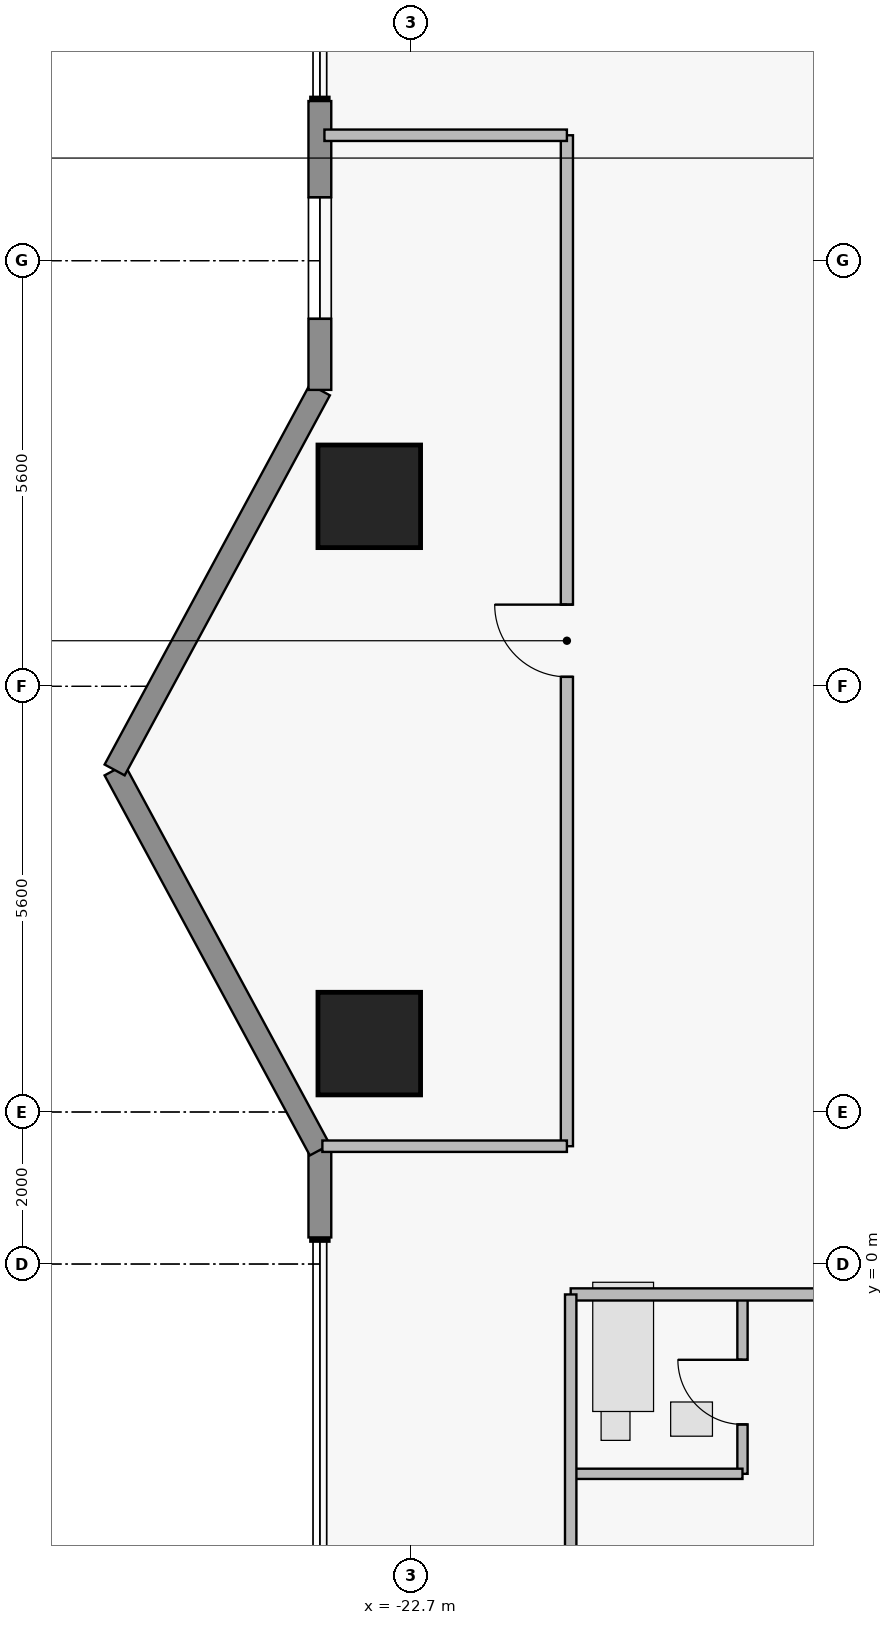
"""IFC4 building model, lengths in metres.
Left out: names, types, materials, properties, quantities, classifications, styles, units other than length and angle.
Written with IfcOpenShell. Run it as: python <this file> out.ifc"""

import sys

from ifc_helpers import new_model, si_unit, direction, frame, frame_2d, origin, origin_2d, place, context, subcontext, project, spatial, rectangle, extrude, element, fill, save


model = new_model("IFC4")
c1 = context("Model", 3, precision=1e-05, world=origin(), true_north=direction((0.0, 1.0)))
c2 = subcontext(c1, "Body", "Model", "MODEL_VIEW")
j1 = project(units=[si_unit("LENGTHUNIT", "METRE"), si_unit("PLANEANGLEUNIT", "RADIAN")], contexts=[c1])
p1 = place(None, origin())
s1 = spatial("IfcSite", under=j1, at=p1, CompositionType="ELEMENT")
p2 = place(p1, origin())
s2 = spatial("IfcBuilding", under=s1, at=p2, CompositionType="ELEMENT")
p3 = place(p2, frame((0.0, 0.0, 139.45)))
s3 = spatial("IfcBuildingStorey", under=s2, at=p3, CompositionType="ELEMENT", Elevation=139.45)
for number, where, z_axis, x_axis in (
    (1, (-23.25, 2.9, 0.0), (0.0, 0.0, 1.0), (1.0, 0.0, 0.0)),
    (2, (-23.25, 10.1, 0.0), (0.0, 0.0, 1.0), (1.0, 0.0, 0.0)),
):
    element("IfcColumn", number, at=place(p3, frame(where, z_axis=z_axis, x_axis=x_axis)), inside=s3, PredefinedType="COLUMN", context=c2, shape_type="SweptSolid", body=[
        extrude(rectangle(XDim=1.35, YDim=1.35, at=origin_2d()), origin(), (0.0, 0.0, 1.0), 3.65),
    ])
p4 = place(p3, frame((-23.9, 0.35, 0.0), z_axis=(0.0, 0.0, 1.0), x_axis=(0.0, 1.0, 0.0)))
e3 = element("IfcWall", 3, at=p4, inside=s3, PredefinedType="STANDARD", context=c2, shape_type="SweptSolid", body=[
    extrude(rectangle(XDim=1.15, YDim=0.3, at=frame_2d((0.575, 0.0))), origin(), (0.0, 0.0, 1.0), 3.43),
])
for number, where, z_axis, x_axis in (
    (4, (-23.9, 1.5, 0.0), (0.0, 0.0, 1.0), (-0.475, 0.88, 0.0)),
    (5, (-26.6, 6.5, 0.0), (0.0, 0.0, 1.0), (0.475, 0.88, 0.0)),
):
    element("IfcWall", number, at=place(p3, frame(where, z_axis=z_axis, x_axis=x_axis)), inside=s3, PredefinedType="STANDARD", context=c2, shape_type="SweptSolid", body=[
        extrude(rectangle(XDim=5.683, YDim=0.3, at=frame_2d((2.841, 0.0))), origin(), (0.0, 0.0, 1.0), 3.43),
    ])
p5 = place(p3, frame((-23.9, 11.5, 0.0), z_axis=(0.0, 0.0, 1.0), x_axis=(0.0, 1.0, 0.0)))
e6 = element("IfcWall", 6, at=p5, inside=s3, PredefinedType="STANDARD", context=c2, shape_type="SweptSolid", body=[
    extrude(rectangle(XDim=3.8, YDim=0.3, at=frame_2d((1.9, 0.0))), origin(), (0.0, 0.0, 1.0), 3.43),
])
p6 = place(p5, frame((0.935, 0.0, 0.85)))
e7 = element("IfcOpeningElement", 7, at=p6, cuts=e6, PredefinedType="OPENING", context=c2, shape_type="SweptSolid", body=[
    extrude(rectangle(XDim=1.6, YDim=1.8, at=frame_2d((0.8, 0.9))), frame((0.0, 0.16, 0.0), z_axis=(0.0, -1.0, 0.0), x_axis=(1.0, 0.0, 0.0)), (0.0, 0.0, 1.0), 0.32),
])
p7 = place(p3, frame((-18.34, -2.76, 0.0), z_axis=(0.0, 0.0, 1.0), x_axis=(0.0, 1.0, 0.0)))
e8 = element("IfcWall", 8, at=p7, inside=s3, PredefinedType="PLUMBINGWALL", context=c2, shape_type="SweptSolid", body=[
    extrude(rectangle(XDim=2.36, YDim=0.135, at=frame_2d((1.18, 0.0))), origin(), (0.0, 0.0, 1.0), 3.43),
])
p8 = place(p7, frame((0.65, 0.0, 0.0)))
e9 = element("IfcOpeningElement", 9, at=p8, cuts=e8, PredefinedType="OPENING", context=c2, shape_type="SweptSolid", body=[
    extrude(rectangle(XDim=0.85, YDim=2.1, at=frame_2d((0.425, 1.05))), frame((0.0, 0.077, 0.0), z_axis=(0.0, -1.0, 0.0), x_axis=(1.0, 0.0, 0.0)), (0.0, 0.0, 1.0), 0.155),
])
p9 = place(p3, frame((-20.6, -0.4, 0.0), z_axis=(0.0, 0.0, 1.0), x_axis=(1.0, 0.0, 0.0)))
e10 = element("IfcWall", 10, at=p9, inside=s3, PredefinedType="PARTITIONING", context=c2, shape_type="SweptSolid", body=[
    extrude(rectangle(XDim=10.2, YDim=0.16, at=frame_2d((5.1, 0.0))), origin(), (0.0, 0.0, 1.0), 3.43),
])
p10 = place(p9, frame((5.75, 0.0, 0.0)))
e11 = element("IfcOpeningElement", 11, at=p10, cuts=e10, PredefinedType="OPENING", context=c2, shape_type="SweptSolid", body=[
    extrude(rectangle(XDim=1.0, YDim=2.15, at=frame_2d((0.5, 1.075))), frame((0.0, 0.09, 0.0), z_axis=(0.0, -1.0, 0.0), x_axis=(1.0, 0.0, 0.0)), (0.0, 0.0, 1.0), 0.18),
])
p11 = place(p3, frame((-20.65, 1.55, 0.0), z_axis=(0.0, 0.0, 1.0), x_axis=(0.0, 1.0, 0.0)))
e12 = element("IfcWall", 12, at=p11, inside=s3, PredefinedType="PARTITIONING", context=c2, shape_type="SweptSolid", body=[
    extrude(rectangle(XDim=13.3, YDim=0.16, at=frame_2d((6.65, 0.0))), origin(), (0.0, 0.0, 1.0), 3.43),
])
p12 = place(p11, frame((6.175, 0.0, 0.0)))
e13 = element("IfcOpeningElement", 13, at=p12, cuts=e12, PredefinedType="OPENING", context=c2, shape_type="SweptSolid", body=[
    extrude(rectangle(XDim=0.95, YDim=2.15, at=frame_2d((0.475, 1.075))), frame((0.0, 0.09, 0.0), z_axis=(0.0, -1.0, 0.0), x_axis=(1.0, 0.0, 0.0)), (0.0, 0.0, 1.0), 0.18),
])
p13 = place(p3, frame((-20.6, -2.76, 0.0), z_axis=(0.0, 0.0, 1.0), x_axis=(1.0, 0.0, 0.0)))
e14 = element("IfcWall", 14, at=p13, inside=s3, PredefinedType="PLUMBINGWALL", context=c2, shape_type="SweptSolid", body=[
    extrude(rectangle(XDim=2.26, YDim=0.135, at=frame_2d((1.13, 0.0))), origin(), (0.0, 0.0, 1.0), 3.43),
])
p14 = place(p3, frame((-20.6, -11.9, 0.0), z_axis=(0.0, 0.0, 1.0), x_axis=(0.0, 1.0, 0.0)))
e15 = element("IfcWall", 15, at=p14, inside=s3, PredefinedType="PARTITIONING", context=c2, shape_type="SweptSolid", body=[
    extrude(rectangle(XDim=11.5, YDim=0.15, at=frame_2d((5.75, 0.0))), origin(), (0.0, 0.0, 1.0), 3.43),
])
p15 = place(p3, frame((-23.867, 1.55, 0.0), z_axis=(0.0, 0.0, 1.0), x_axis=(1.0, 0.0, 0.0)))
e16 = element("IfcWall", 16, at=p15, inside=s3, PredefinedType="PARTITIONING", context=c2, shape_type="SweptSolid", body=[
    extrude(rectangle(XDim=3.217, YDim=0.15, at=frame_2d((1.608, 0.0))), origin(), (0.0, 0.0, 1.0), 3.43),
])
p16 = place(p3, frame((-23.84, 14.85, 0.0), z_axis=(0.0, 0.0, 1.0), x_axis=(1.0, 0.0, 0.0)))
e17 = element("IfcWall", 17, at=p16, inside=s3, PredefinedType="PARTITIONING", context=c2, shape_type="SweptSolid", body=[
    extrude(rectangle(XDim=3.19, YDim=0.15, at=frame_2d((1.595, 0.0))), origin(), (0.0, 0.0, 1.0), 3.43),
])
p17 = place(p6, origin())
e18 = element("IfcWindow", 18, at=p17, inside=s3, PartitioningType="SINGLE_PANEL", PredefinedType="WINDOW", context=c2, shape_type="SweptSolid", body=[
    extrude(rectangle(XDim=1.6, YDim=1.8, at=frame_2d((0.8, 0.9))), frame((0.0, 0.03, 0.0), z_axis=(0.0, -1.0, 0.0), x_axis=(1.0, 0.0, 0.0)), (0.0, 0.0, 1.0), 0.06),
])
fill(e7, e18)
p18 = place(p8, origin())
e19 = element("IfcDoor", 19, at=p18, inside=s3, OperationType="SINGLE_SWING_RIGHT", PredefinedType="DOOR", context=c2, shape_type="SweptSolid", body=[
    extrude(rectangle(XDim=0.85, YDim=2.1, at=frame_2d((0.425, 1.05))), frame((0.0, 0.025, 0.0), z_axis=(0.0, -1.0, 0.0), x_axis=(1.0, 0.0, 0.0)), (0.0, 0.0, 1.0), 0.05),
])
fill(e9, e19)
p19 = place(p12, origin())
e20 = element("IfcDoor", 20, at=p19, inside=s3, OperationType="SINGLE_SWING_RIGHT", PredefinedType="DOOR", context=c2, shape_type="SweptSolid", body=[
    extrude(rectangle(XDim=0.95, YDim=2.15, at=frame_2d((0.475, 1.075))), frame((0.0, 0.025, 0.0), z_axis=(0.0, -1.0, 0.0), x_axis=(1.0, 0.0, 0.0)), (0.0, 0.0, 1.0), 0.05),
])
fill(e13, e20)
save(model, sys.argv[1])
